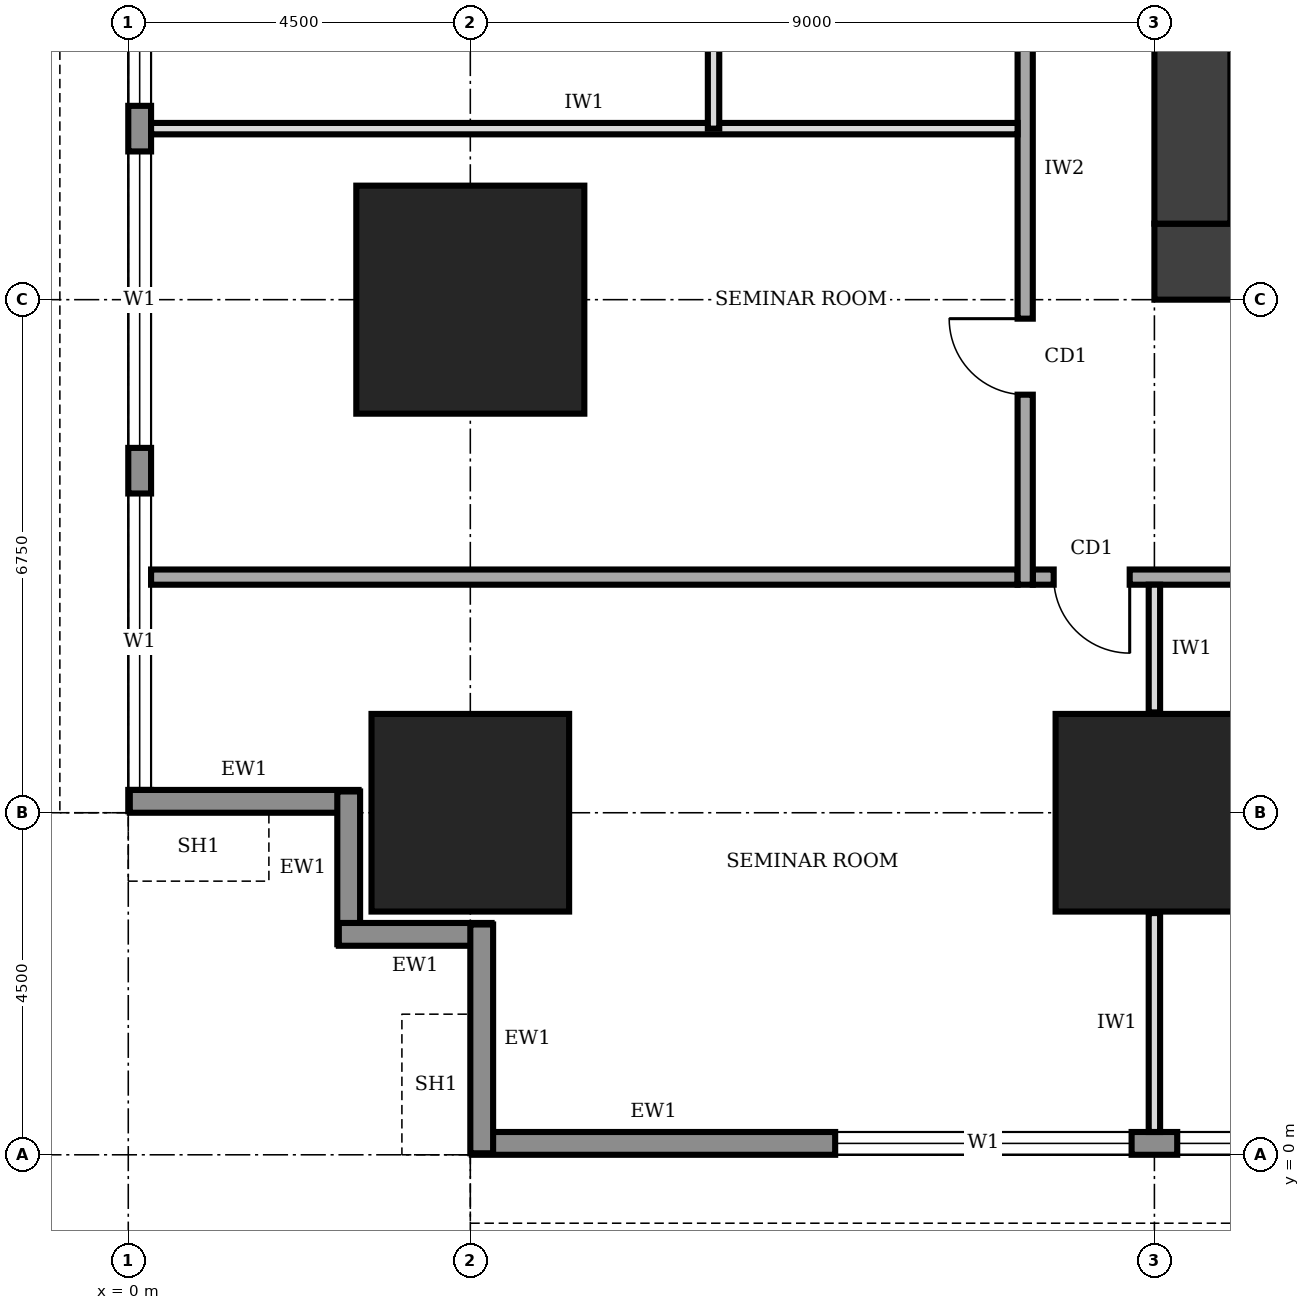
"""IFC4 building model, lengths in metres.
Left out: names, types, materials, properties, quantities, classifications, styles, units other than length and angle.
Written with IfcOpenShell. Run it as: python <this file> out.ifc"""

import sys

from ifc_helpers import new_model, si_unit, direction, frame, frame_2d, origin, origin_2d, place, context, subcontext, project, spatial, rectangle, extrude, element, fill, save


model = new_model("IFC4")
c1 = context("Model", 3, precision=1e-05, world=origin(), true_north=direction((0.0, 1.0)))
c2 = subcontext(c1, "Body", "Model", "MODEL_VIEW")
j1 = project(units=[si_unit("LENGTHUNIT", "METRE"), si_unit("PLANEANGLEUNIT", "RADIAN")], contexts=[c1])
p1 = place(None, origin())
s1 = spatial("IfcSite", under=j1, at=p1, CompositionType="ELEMENT")
p2 = place(p1, origin())
s2 = spatial("IfcBuilding", under=s1, at=p2, CompositionType="ELEMENT")
p3 = place(p2, frame((0.0, 0.0, 33.0)))
s3 = spatial("IfcBuildingStorey", under=s2, at=p3, CompositionType="ELEMENT", Elevation=33.0)
p4 = place(p3, frame((13.5, 11.75, 0.0), z_axis=(0.0, 0.0, 1.0), x_axis=(1.0, 0.0, 0.0)))
e1 = element("IfcWall", 1, at=p4, inside=s3, PredefinedType="SHEAR", context=c2, shape_type="SweptSolid", body=[
    extrude(rectangle(XDim=13.5, YDim=1.0, at=frame_2d((6.75, 0.0))), origin(), (0.0, 0.0, 1.0), 4.0),
])
p5 = place(p4, frame((4.75, 0.0, 0.0)))
e2 = element("IfcOpeningElement", 2, at=p5, cuts=e1, PredefinedType="OPENING", context=c2, shape_type="SweptSolid", body=[
    extrude(rectangle(XDim=1.0, YDim=2.1, at=frame_2d((0.5, 1.05))), frame((0.0, 0.51, 0.0), z_axis=(0.0, -1.0, 0.0), x_axis=(1.0, 0.0, 0.0)), (0.0, 0.0, 1.0), 1.02),
])
p6 = place(p3, frame((14.0, 28.25, 0.0), z_axis=(0.0, 0.0, 1.0), x_axis=(0.0, -1.0, 0.0)))
e3 = element("IfcWall", 3, at=p6, inside=s3, PredefinedType="SHEAR", context=c2, shape_type="SweptSolid", body=[
    extrude(rectangle(XDim=16.0, YDim=1.0, at=frame_2d((8.0, 0.0))), origin(), (0.0, 0.0, 1.0), 4.0),
])
for number, where, z_axis, x_axis in (
    (4, (4.5, 4.5, 0.0), (0.0, 0.0, 1.0), (1.0, 0.0, 0.0)),
    (5, (13.5, 4.5, 0.0), (0.0, 0.0, 1.0), (1.0, 0.0, 0.0)),
):
    element("IfcColumn", number, at=place(p3, frame(where, z_axis=z_axis, x_axis=x_axis)), inside=s3, PredefinedType="COLUMN", context=c2, shape_type="SweptSolid", body=[
        extrude(rectangle(XDim=2.6, YDim=2.6, at=origin_2d()), origin(), (0.0, 0.0, 1.0), 4.0),
    ])
p7 = place(p3, frame((4.5, 11.25, 0.0), z_axis=(0.0, 0.0, 1.0), x_axis=(1.0, 0.0, 0.0)))
e6 = element("IfcColumn", 6, at=p7, inside=s3, PredefinedType="COLUMN", context=c2, shape_type="SweptSolid", body=[
    extrude(rectangle(XDim=3.0, YDim=3.0, at=origin_2d()), origin(), (0.0, 0.0, 1.0), 4.0),
])
p8 = place(p3, frame((4.52, 0.15, 0.0), z_axis=(0.0, 0.0, 1.0), x_axis=(1.0, 0.0, 0.0)))
e7 = element("IfcWall", 7, at=p8, inside=s3, PredefinedType="STANDARD", context=c2, shape_type="SweptSolid", body=[
    extrude(rectangle(XDim=31.46, YDim=0.3, at=frame_2d((15.73, 0.0))), origin(), (0.0, 0.0, 1.0), 3.75),
])
p9 = place(p8, frame((4.78, 0.0, 0.9)))
e8 = element("IfcOpeningElement", 8, at=p9, cuts=e7, PredefinedType="OPENING", context=c2, shape_type="SweptSolid", body=[
    extrude(rectangle(XDim=3.9, YDim=2.2, at=frame_2d((1.95, 1.1))), frame((0.0, 0.16, 0.0), z_axis=(0.0, -1.0, 0.0), x_axis=(1.0, 0.0, 0.0)), (0.0, 0.0, 1.0), 0.32),
])
p10 = place(p8, frame((9.28, 0.0, 0.9)))
e9 = element("IfcOpeningElement", 9, at=p10, cuts=e7, PredefinedType="OPENING", context=c2, shape_type="SweptSolid", body=[
    extrude(rectangle(XDim=3.9, YDim=2.2, at=frame_2d((1.95, 1.1))), frame((0.0, 0.16, 0.0), z_axis=(0.0, -1.0, 0.0), x_axis=(1.0, 0.0, 0.0)), (0.0, 0.0, 1.0), 0.32),
])
p11 = place(p8, frame((13.78, 0.0, 0.9)))
e10 = element("IfcOpeningElement", 10, at=p11, cuts=e7, PredefinedType="OPENING", context=c2, shape_type="SweptSolid", body=[
    extrude(rectangle(XDim=3.9, YDim=2.2, at=frame_2d((1.95, 1.1))), frame((0.0, 0.16, 0.0), z_axis=(0.0, -1.0, 0.0), x_axis=(1.0, 0.0, 0.0)), (0.0, 0.0, 1.0), 0.32),
])
p12 = place(p8, frame((18.28, 0.0, 0.9)))
e11 = element("IfcOpeningElement", 11, at=p12, cuts=e7, PredefinedType="OPENING", context=c2, shape_type="SweptSolid", body=[
    extrude(rectangle(XDim=3.9, YDim=2.2, at=frame_2d((1.95, 1.1))), frame((0.0, 0.16, 0.0), z_axis=(0.0, -1.0, 0.0), x_axis=(1.0, 0.0, 0.0)), (0.0, 0.0, 1.0), 0.32),
])
p13 = place(p8, frame((22.78, 0.0, 0.9)))
e12 = element("IfcOpeningElement", 12, at=p13, cuts=e7, PredefinedType="OPENING", context=c2, shape_type="SweptSolid", body=[
    extrude(rectangle(XDim=3.9, YDim=2.2, at=frame_2d((1.95, 1.1))), frame((0.0, 0.16, 0.0), z_axis=(0.0, -1.0, 0.0), x_axis=(1.0, 0.0, 0.0)), (0.0, 0.0, 1.0), 0.32),
])
p14 = place(p8, frame((27.28, 0.0, 0.9)))
e13 = element("IfcOpeningElement", 13, at=p14, cuts=e7, PredefinedType="OPENING", context=c2, shape_type="SweptSolid", body=[
    extrude(rectangle(XDim=3.9, YDim=2.2, at=frame_2d((1.95, 1.1))), frame((0.0, 0.16, 0.0), z_axis=(0.0, -1.0, 0.0), x_axis=(1.0, 0.0, 0.0)), (0.0, 0.0, 1.0), 0.32),
])
p15 = place(p3, frame((0.15, 35.98, 0.0), z_axis=(0.0, 0.0, 1.0), x_axis=(0.0, -1.0, 0.0)))
e14 = element("IfcWall", 14, at=p15, inside=s3, PredefinedType="STANDARD", context=c2, shape_type="SweptSolid", body=[
    extrude(rectangle(XDim=31.46, YDim=0.3, at=frame_2d((15.73, 0.0))), origin(), (0.0, 0.0, 1.0), 3.75),
])
p16 = place(p15, frame((27.28, 0.0, 0.9)))
e15 = element("IfcOpeningElement", 15, at=p16, cuts=e14, PredefinedType="OPENING", context=c2, shape_type="SweptSolid", body=[
    extrude(rectangle(XDim=3.9, YDim=2.2, at=frame_2d((1.95, 1.1))), frame((0.0, 0.16, 0.0), z_axis=(0.0, -1.0, 0.0), x_axis=(1.0, 0.0, 0.0)), (0.0, 0.0, 1.0), 0.32),
])
p17 = place(p15, frame((22.78, 0.0, 0.9)))
e16 = element("IfcOpeningElement", 16, at=p17, cuts=e14, PredefinedType="OPENING", context=c2, shape_type="SweptSolid", body=[
    extrude(rectangle(XDim=3.9, YDim=2.2, at=frame_2d((1.95, 1.1))), frame((0.0, 0.16, 0.0), z_axis=(0.0, -1.0, 0.0), x_axis=(1.0, 0.0, 0.0)), (0.0, 0.0, 1.0), 0.32),
])
p18 = place(p15, frame((18.28, 0.0, 0.9)))
e17 = element("IfcOpeningElement", 17, at=p18, cuts=e14, PredefinedType="OPENING", context=c2, shape_type="SweptSolid", body=[
    extrude(rectangle(XDim=3.9, YDim=2.2, at=frame_2d((1.95, 1.1))), frame((0.0, 0.16, 0.0), z_axis=(0.0, -1.0, 0.0), x_axis=(1.0, 0.0, 0.0)), (0.0, 0.0, 1.0), 0.32),
])
p19 = place(p15, frame((13.78, 0.0, 0.9)))
e18 = element("IfcOpeningElement", 18, at=p19, cuts=e14, PredefinedType="OPENING", context=c2, shape_type="SweptSolid", body=[
    extrude(rectangle(XDim=3.9, YDim=2.2, at=frame_2d((1.95, 1.1))), frame((0.0, 0.16, 0.0), z_axis=(0.0, -1.0, 0.0), x_axis=(1.0, 0.0, 0.0)), (0.0, 0.0, 1.0), 0.32),
])
p20 = place(p15, frame((9.28, 0.0, 0.9)))
e19 = element("IfcOpeningElement", 19, at=p20, cuts=e14, PredefinedType="OPENING", context=c2, shape_type="SweptSolid", body=[
    extrude(rectangle(XDim=3.9, YDim=2.2, at=frame_2d((1.95, 1.1))), frame((0.0, 0.16, 0.0), z_axis=(0.0, -1.0, 0.0), x_axis=(1.0, 0.0, 0.0)), (0.0, 0.0, 1.0), 0.32),
])
p21 = place(p15, frame((4.78, 0.0, 0.9)))
e20 = element("IfcOpeningElement", 20, at=p21, cuts=e14, PredefinedType="OPENING", context=c2, shape_type="SweptSolid", body=[
    extrude(rectangle(XDim=3.9, YDim=2.2, at=frame_2d((1.95, 1.1))), frame((0.0, 0.16, 0.0), z_axis=(0.0, -1.0, 0.0), x_axis=(1.0, 0.0, 0.0)), (0.0, 0.0, 1.0), 0.32),
])
p22 = place(p3, frame((0.02, 4.65, 0.0), z_axis=(0.0, 0.0, 1.0), x_axis=(1.0, 0.0, 0.0)))
e21 = element("IfcWall", 21, at=p22, inside=s3, PredefinedType="STANDARD", context=c2, shape_type="SweptSolid", body=[
    extrude(rectangle(XDim=3.01, YDim=0.3, at=frame_2d((1.505, 0.0))), origin(), (0.0, 0.0, 1.0), 2.85),
])
for number, where, z_axis, x_axis in (
    (22, (2.9, 4.78, 0.0), (0.0, 0.0, 1.0), (0.0, -1.0, 0.0)),
    (23, (2.77, 2.9, 0.0), (0.0, 0.0, 1.0), (1.0, 0.0, 0.0)),
):
    element("IfcWall", number, at=place(p3, frame(where, z_axis=z_axis, x_axis=x_axis)), inside=s3, PredefinedType="STANDARD", context=c2, shape_type="SweptSolid", body=[
        extrude(rectangle(XDim=2.01, YDim=0.3, at=frame_2d((1.005, 0.0))), origin(), (0.0, 0.0, 1.0), 3.75),
    ])
p23 = place(p3, frame((4.65, 3.03, 0.0), z_axis=(0.0, 0.0, 1.0), x_axis=(0.0, -1.0, 0.0)))
e24 = element("IfcWall", 24, at=p23, inside=s3, PredefinedType="STANDARD", context=c2, shape_type="SweptSolid", body=[
    extrude(rectangle(XDim=3.01, YDim=0.3, at=frame_2d((1.505, 0.0))), origin(), (0.0, 0.0, 1.0), 2.85),
])
p24 = place(p3, frame((11.9, 7.6, 0.0), z_axis=(0.0, 0.0, 1.0), x_axis=(1.0, 0.0, 0.0)))
e25 = element("IfcWall", 25, at=p24, inside=s3, PredefinedType="SOLIDWALL", context=c2, shape_type="SweptSolid", body=[
    extrude(rectangle(XDim=16.9, YDim=0.2, at=frame_2d((8.45, 0.0))), origin(), (0.0, 0.0, 1.0), 3.75),
])
p25 = place(p24, frame((0.275, 0.0, 0.0)))
e26 = element("IfcOpeningElement", 26, at=p25, cuts=e25, PredefinedType="OPENING", context=c2, shape_type="SweptSolid", body=[
    extrude(rectangle(XDim=1.0, YDim=2.1, at=frame_2d((0.5, 1.05))), frame((0.0, 0.11, 0.0), z_axis=(0.0, -1.0, 0.0), x_axis=(1.0, 0.0, 0.0)), (0.0, 0.0, 1.0), 0.22),
])
p26 = place(p24, frame((5.6, 0.0, 0.0)))
e27 = element("IfcOpeningElement", 27, at=p26, cuts=e25, PredefinedType="OPENING", context=c2, shape_type="SweptSolid", body=[
    extrude(rectangle(XDim=1.0, YDim=2.1, at=frame_2d((0.5, 1.05))), frame((0.0, 0.11, 0.0), z_axis=(0.0, -1.0, 0.0), x_axis=(1.0, 0.0, 0.0)), (0.0, 0.0, 1.0), 0.22),
])
p27 = place(p24, frame((12.35, 0.0, 0.0)))
e28 = element("IfcOpeningElement", 28, at=p27, cuts=e25, PredefinedType="OPENING", context=c2, shape_type="SweptSolid", body=[
    extrude(rectangle(XDim=1.0, YDim=2.1, at=frame_2d((0.5, 1.05))), frame((0.0, 0.11, 0.0), z_axis=(0.0, -1.0, 0.0), x_axis=(1.0, 0.0, 0.0)), (0.0, 0.0, 1.0), 0.22),
])
p28 = place(p24, frame((15.425, 0.0, 0.0)))
e29 = element("IfcOpeningElement", 29, at=p28, cuts=e25, PredefinedType="OPENING", context=c2, shape_type="SweptSolid", body=[
    extrude(rectangle(XDim=1.0, YDim=2.1, at=frame_2d((0.5, 1.05))), frame((0.0, 0.11, 0.0), z_axis=(0.0, -1.0, 0.0), x_axis=(1.0, 0.0, 0.0)), (0.0, 0.0, 1.0), 0.22),
])
p29 = place(p3, frame((11.8, 31.3, 0.0), z_axis=(0.0, 0.0, 1.0), x_axis=(0.0, -1.0, 0.0)))
e30 = element("IfcWall", 30, at=p29, inside=s3, PredefinedType="SOLIDWALL", context=c2, shape_type="SweptSolid", body=[
    extrude(rectangle(XDim=23.8, YDim=0.2, at=frame_2d((11.9, 0.0))), origin(), (0.0, 0.0, 1.0), 3.75),
])
p30 = place(p29, frame((20.3, 0.0, 0.0)))
e31 = element("IfcOpeningElement", 31, at=p30, cuts=e30, PredefinedType="OPENING", context=c2, shape_type="SweptSolid", body=[
    extrude(rectangle(XDim=1.0, YDim=2.1, at=frame_2d((0.5, 1.05))), frame((0.0, 0.11, 0.0), z_axis=(0.0, -1.0, 0.0), x_axis=(1.0, 0.0, 0.0)), (0.0, 0.0, 1.0), 0.22),
])
p31 = place(p29, frame((15.45, 0.0, 0.0)))
e32 = element("IfcOpeningElement", 32, at=p31, cuts=e30, PredefinedType="OPENING", context=c2, shape_type="SweptSolid", body=[
    extrude(rectangle(XDim=0.9, YDim=2.1, at=frame_2d((0.45, 1.05))), frame((0.0, 0.11, 0.0), z_axis=(0.0, -1.0, 0.0), x_axis=(1.0, 0.0, 0.0)), (0.0, 0.0, 1.0), 0.22),
])
p32 = place(p29, frame((12.45, 0.0, 0.0)))
e33 = element("IfcOpeningElement", 33, at=p32, cuts=e30, PredefinedType="OPENING", context=c2, shape_type="SweptSolid", body=[
    extrude(rectangle(XDim=0.9, YDim=2.1, at=frame_2d((0.45, 1.05))), frame((0.0, 0.11, 0.0), z_axis=(0.0, -1.0, 0.0), x_axis=(1.0, 0.0, 0.0)), (0.0, 0.0, 1.0), 0.22),
])
p33 = place(p29, frame((7.6, 0.0, 0.0)))
e34 = element("IfcOpeningElement", 34, at=p33, cuts=e30, PredefinedType="OPENING", context=c2, shape_type="SweptSolid", body=[
    extrude(rectangle(XDim=0.9, YDim=2.1, at=frame_2d((0.45, 1.05))), frame((0.0, 0.11, 0.0), z_axis=(0.0, -1.0, 0.0), x_axis=(1.0, 0.0, 0.0)), (0.0, 0.0, 1.0), 0.22),
])
p34 = place(p29, frame((4.8, 0.0, 0.0)))
e35 = element("IfcOpeningElement", 35, at=p34, cuts=e30, PredefinedType="OPENING", context=c2, shape_type="SweptSolid", body=[
    extrude(rectangle(XDim=1.0, YDim=2.1, at=frame_2d((0.5, 1.05))), frame((0.0, 0.11, 0.0), z_axis=(0.0, -1.0, 0.0), x_axis=(1.0, 0.0, 0.0)), (0.0, 0.0, 1.0), 0.22),
])
p35 = place(p29, frame((10.3, 0.0, 0.0)))
e36 = element("IfcOpeningElement", 36, at=p35, cuts=e30, PredefinedType="OPENING", context=c2, shape_type="SweptSolid", body=[
    extrude(rectangle(XDim=1.0, YDim=2.1, at=frame_2d((0.5, 1.05))), frame((0.0, 0.11, 0.0), z_axis=(0.0, -1.0, 0.0), x_axis=(1.0, 0.0, 0.0)), (0.0, 0.0, 1.0), 0.22),
])
p36 = place(p29, frame((1.55, 0.0, 0.0)))
e37 = element("IfcOpeningElement", 37, at=p36, cuts=e30, PredefinedType="OPENING", context=c2, shape_type="SweptSolid", body=[
    extrude(rectangle(XDim=1.0, YDim=2.1, at=frame_2d((0.5, 1.05))), frame((0.0, 0.11, 0.0), z_axis=(0.0, -1.0, 0.0), x_axis=(1.0, 0.0, 0.0)), (0.0, 0.0, 1.0), 0.22),
])
p37 = place(p3, frame((0.3, 7.6, 0.0), z_axis=(0.0, 0.0, 1.0), x_axis=(1.0, 0.0, 0.0)))
e38 = element("IfcWall", 38, at=p37, inside=s3, PredefinedType="SOLIDWALL", context=c2, shape_type="SweptSolid", body=[
    extrude(rectangle(XDim=11.4, YDim=0.2, at=frame_2d((5.7, 0.0))), origin(), (0.0, 0.0, 1.0), 3.75),
])
p38 = place(p3, frame((13.5, 0.3, 0.0), z_axis=(0.0, 0.0, 1.0), x_axis=(0.0, 1.0, 0.0)))
e39 = element("IfcWall", 39, at=p38, inside=s3, PredefinedType="PARTITIONING", context=c2, shape_type="SweptSolid", body=[
    extrude(rectangle(XDim=2.88, YDim=0.15, at=frame_2d((1.44, 0.0))), origin(), (0.0, 0.0, 1.0), 2.85),
])
p39 = place(p3, frame((13.5, 5.82, 0.0), z_axis=(0.0, 0.0, 1.0), x_axis=(0.0, 1.0, 0.0)))
e40 = element("IfcWall", 40, at=p39, inside=s3, PredefinedType="PARTITIONING", context=c2, shape_type="SweptSolid", body=[
    extrude(rectangle(XDim=1.68, YDim=0.15, at=frame_2d((0.84, 0.0))), origin(), (0.0, 0.0, 1.0), 2.85),
])
p40 = place(p3, frame((0.3, 13.5, 0.0), z_axis=(0.0, 0.0, 1.0), x_axis=(1.0, 0.0, 0.0)))
e41 = element("IfcWall", 41, at=p40, inside=s3, PredefinedType="PARTITIONING", context=c2, shape_type="SweptSolid", body=[
    extrude(rectangle(XDim=11.4, YDim=0.15, at=frame_2d((5.7, 0.0))), origin(), (0.0, 0.0, 1.0), 3.75),
])
p41 = place(p3, frame((7.7, 13.5, 0.0), z_axis=(0.0, 0.0, 1.0), x_axis=(0.0, 1.0, 0.0)))
e42 = element("IfcWall", 42, at=p41, inside=s3, PredefinedType="PARTITIONING", context=c2, shape_type="SweptSolid", body=[
    extrude(rectangle(XDim=3.8, YDim=0.15, at=frame_2d((1.9, 0.0))), origin(), (0.0, 0.0, 1.0), 3.75),
])
p42 = place(p9, origin())
e43 = element("IfcWindow", 43, at=p42, inside=s3, PartitioningType="SINGLE_PANEL", PredefinedType="WINDOW", context=c2, shape_type="SweptSolid", body=[
    extrude(rectangle(XDim=3.9, YDim=2.2, at=frame_2d((1.95, 1.1))), frame((0.0, 0.03, 0.0), z_axis=(0.0, -1.0, 0.0), x_axis=(1.0, 0.0, 0.0)), (0.0, 0.0, 1.0), 0.06),
])
fill(e8, e43)
p43 = place(p10, origin())
e44 = element("IfcWindow", 44, at=p43, inside=s3, PartitioningType="SINGLE_PANEL", PredefinedType="WINDOW", context=c2, shape_type="SweptSolid", body=[
    extrude(rectangle(XDim=3.9, YDim=2.2, at=frame_2d((1.95, 1.1))), frame((0.0, 0.03, 0.0), z_axis=(0.0, -1.0, 0.0), x_axis=(1.0, 0.0, 0.0)), (0.0, 0.0, 1.0), 0.06),
])
fill(e9, e44)
p44 = place(p16, origin())
e45 = element("IfcWindow", 45, at=p44, inside=s3, PartitioningType="SINGLE_PANEL", PredefinedType="WINDOW", context=c2, shape_type="SweptSolid", body=[
    extrude(rectangle(XDim=3.9, YDim=2.2, at=frame_2d((1.95, 1.1))), frame((0.0, 0.03, 0.0), z_axis=(0.0, -1.0, 0.0), x_axis=(1.0, 0.0, 0.0)), (0.0, 0.0, 1.0), 0.06),
])
fill(e15, e45)
p45 = place(p17, origin())
e46 = element("IfcWindow", 46, at=p45, inside=s3, PartitioningType="SINGLE_PANEL", PredefinedType="WINDOW", context=c2, shape_type="SweptSolid", body=[
    extrude(rectangle(XDim=3.9, YDim=2.2, at=frame_2d((1.95, 1.1))), frame((0.0, 0.03, 0.0), z_axis=(0.0, -1.0, 0.0), x_axis=(1.0, 0.0, 0.0)), (0.0, 0.0, 1.0), 0.06),
])
fill(e16, e46)
p46 = place(p18, origin())
e47 = element("IfcWindow", 47, at=p46, inside=s3, PartitioningType="SINGLE_PANEL", PredefinedType="WINDOW", context=c2, shape_type="SweptSolid", body=[
    extrude(rectangle(XDim=3.9, YDim=2.2, at=frame_2d((1.95, 1.1))), frame((0.0, 0.03, 0.0), z_axis=(0.0, -1.0, 0.0), x_axis=(1.0, 0.0, 0.0)), (0.0, 0.0, 1.0), 0.06),
])
fill(e17, e47)
p47 = place(p25, frame((1.0, 0.0, 0.0), z_axis=(0.0, 0.0, 1.0), x_axis=(-1.0, 0.0, 0.0)))
e48 = element("IfcDoor", 48, at=p47, inside=s3, OperationType="SINGLE_SWING_LEFT", PredefinedType="DOOR", context=c2, shape_type="SweptSolid", body=[
    extrude(rectangle(XDim=1.0, YDim=2.1, at=frame_2d((0.5, 1.05))), frame((0.0, 0.025, 0.0), z_axis=(0.0, -1.0, 0.0), x_axis=(1.0, 0.0, 0.0)), (0.0, 0.0, 1.0), 0.05),
])
fill(e26, e48)
p48 = place(p30, frame((1.0, 0.0, 0.0), z_axis=(0.0, 0.0, 1.0), x_axis=(-1.0, 0.0, 0.0)))
e49 = element("IfcDoor", 49, at=p48, inside=s3, OperationType="SINGLE_SWING_RIGHT", PredefinedType="DOOR", context=c2, shape_type="SweptSolid", body=[
    extrude(rectangle(XDim=1.0, YDim=2.1, at=frame_2d((0.5, 1.05))), frame((0.0, 0.025, 0.0), z_axis=(0.0, -1.0, 0.0), x_axis=(1.0, 0.0, 0.0)), (0.0, 0.0, 1.0), 0.05),
])
fill(e31, e49)
save(model, sys.argv[1])
